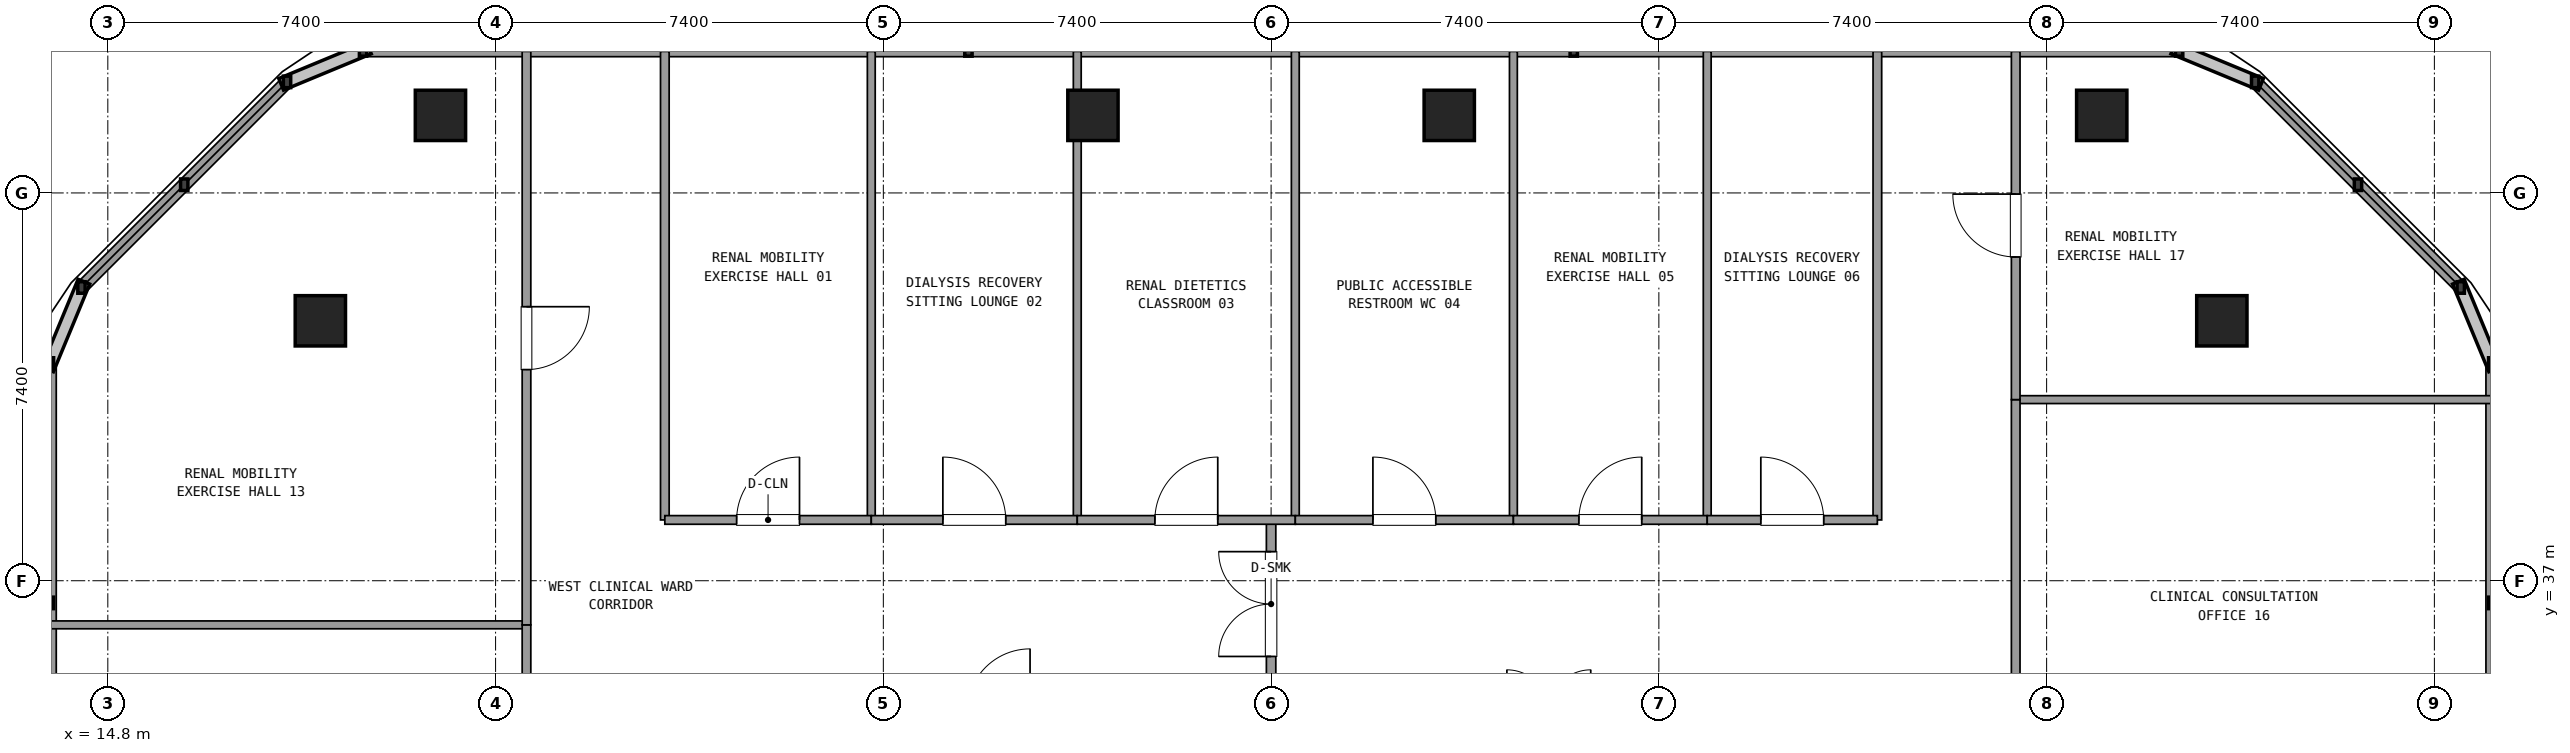
"""IFC4 building model, lengths in metres.
Left out: names, types, materials, properties, quantities, classifications, styles, units other than length and angle.
Written with IfcOpenShell. Run it as: python <this file> out.ifc"""

import sys

from ifc_helpers import new_model, si_unit, direction, frame, frame_2d, origin, origin_2d, place, context, subcontext, project, spatial, rectangle, extrude, element, fill, save


model = new_model("IFC4")
c1 = context("Model", 3, precision=1e-05, world=origin(), true_north=direction((0.0, 1.0)))
c2 = subcontext(c1, "Body", "Model", "MODEL_VIEW")
j1 = project(units=[si_unit("LENGTHUNIT", "METRE"), si_unit("PLANEANGLEUNIT", "RADIAN")], contexts=[c1])
p1 = place(None, origin())
s1 = spatial("IfcSite", under=j1, at=p1, CompositionType="ELEMENT")
p2 = place(p1, origin())
s2 = spatial("IfcBuilding", under=s1, at=p2, CompositionType="ELEMENT")
p3 = place(p2, frame((0.0, 0.0, 156.42)))
s3 = spatial("IfcBuildingStorey", under=s2, at=p3, CompositionType="ELEMENT", Elevation=156.42)
for number, where, z_axis, x_axis in (
    (1, (55.144, 41.96, 0.0), (0.0, 0.0, 1.0), (1.0, 0.0, 0.0)),
    (2, (52.852, 45.88, 0.0), (0.0, 0.0, 1.0), (1.0, 0.0, 0.0)),
    (3, (40.4, 45.88, 0.0), (0.0, 0.0, 1.0), (1.0, 0.0, 0.0)),
    (4, (33.6, 45.88, 0.0), (0.0, 0.0, 1.0), (1.0, 0.0, 0.0)),
    (5, (21.148, 45.88, 0.0), (0.0, 0.0, 1.0), (1.0, 0.0, 0.0)),
    (6, (18.856, 41.96, 0.0), (0.0, 0.0, 1.0), (1.0, 0.0, 0.0)),
):
    element("IfcColumn", number, at=place(p3, frame(where, z_axis=z_axis, x_axis=x_axis)), inside=s3, PredefinedType="COLUMN", context=c2, shape_type="SweptSolid", body=[
        extrude(rectangle(XDim=0.96, YDim=0.96, at=origin_2d()), origin(), (0.0, 0.0, 1.0), 3.6),
    ])
p4 = place(p3, frame((60.304, 27.44, 0.0), z_axis=(0.0, 0.0, 1.0), x_axis=(0.0, 1.0, 0.0)))
e7 = element("IfcWall", 7, at=p4, inside=s3, PredefinedType="SOLIDWALL", context=c2, shape_type="SweptSolid", body=[
    extrude(rectangle(XDim=13.705, YDim=0.24, at=frame_2d((6.853, 0.0))), origin(), (0.0, 0.0, 1.0), 0.85),
])
p5 = place(p3, frame((59.703, 42.596, 0.0), z_axis=(0.0, 0.0, 1.0), x_axis=(-0.707084777957, 0.707128783731, 0.0)))
e8 = element("IfcWall", 8, at=p5, inside=s3, PredefinedType="SOLIDWALL", context=c2, shape_type="SweptSolid", body=[
    extrude(rectangle(XDim=5.548, YDim=0.24, at=frame_2d((2.774, 0.0))), origin(), (0.0, 0.0, 1.0), 0.85),
])
p6 = place(p3, frame((54.329, 47.12, 0.0), z_axis=(0.0, 0.0, 1.0), x_axis=(-1.0, 0.0, 0.0)))
e9 = element("IfcWall", 9, at=p6, inside=s3, PredefinedType="SOLIDWALL", context=c2, shape_type="SweptSolid", body=[
    extrude(rectangle(XDim=34.658, YDim=0.24, at=frame_2d((17.329, 0.0))), origin(), (0.0, 0.0, 1.0), 0.85),
])
p7 = place(p3, frame((18.22, 46.519, 0.0), z_axis=(0.0, 0.0, 1.0), x_axis=(-0.707084777957, -0.707128783731, 0.0)))
e10 = element("IfcWall", 10, at=p7, inside=s3, PredefinedType="SOLIDWALL", context=c2, shape_type="SweptSolid", body=[
    extrude(rectangle(XDim=5.548, YDim=0.24, at=frame_2d((2.774, 0.0))), origin(), (0.0, 0.0, 1.0), 0.85),
])
p8 = place(p3, frame((13.696, 41.145, 0.0), z_axis=(0.0, 0.0, 1.0), x_axis=(0.0, -1.0, 0.0)))
e11 = element("IfcWall", 11, at=p8, inside=s3, PredefinedType="SOLIDWALL", context=c2, shape_type="SweptSolid", body=[
    extrude(rectangle(XDim=13.705, YDim=0.24, at=frame_2d((6.853, 0.0))), origin(), (0.0, 0.0, 1.0), 0.85),
])
p9 = place(p3, frame((37.0, 34.95, 0.0), z_axis=(0.0, 0.0, 1.0), x_axis=(0.0, 1.0, 0.0)))
e12 = element("IfcWall", 12, at=p9, inside=s3, PredefinedType="PARTITIONING", context=c2, shape_type="SweptSolid", body=[
    extrude(rectangle(XDim=3.21, YDim=0.18, at=frame_2d((1.605, 0.0))), origin(), (0.0, 0.0, 1.0), 2.61),
])
p10 = place(p9, frame((0.605, 0.0, 0.0)))
e13 = element("IfcOpeningElement", 13, at=p10, cuts=e12, PredefinedType="OPENING", context=c2, shape_type="SweptSolid", body=[
    extrude(rectangle(XDim=2.0, YDim=2.2, at=frame_2d((1.0, 1.1))), frame((0.0, 0.1, 0.0), z_axis=(0.0, -1.0, 0.0), x_axis=(1.0, 0.0, 0.0)), (0.0, 0.0, 1.0), 0.2),
])
for number, where, z_axis, x_axis in (
    (14, (25.43, 38.16, 0.0), (0.0, 0.0, 1.0), (0.0, 1.0, 0.0)),
    (15, (48.57, 38.16, 0.0), (0.0, 0.0, 1.0), (0.0, 1.0, 0.0)),
):
    element("IfcWall", number, at=place(p3, frame(where, z_axis=z_axis, x_axis=x_axis)), inside=s3, PredefinedType="PARTITIONING", context=c2, shape_type="SweptSolid", body=[
        extrude(rectangle(XDim=8.94, YDim=0.165, at=frame_2d((4.47, 0.0))), origin(), (0.0, 0.0, 1.0), 2.61),
    ])
p11 = place(p3, frame((29.37, 38.16, 0.0), z_axis=(0.0, 0.0, 1.0), x_axis=(0.0, 1.0, 0.0)))
e16 = element("IfcWall", 16, at=p11, inside=s3, PredefinedType="PARTITIONING", context=c2, shape_type="SweptSolid", body=[
    extrude(rectangle(XDim=8.94, YDim=0.15, at=frame_2d((4.47, 0.0))), origin(), (0.0, 0.0, 1.0), 2.61),
])
p12 = place(p3, frame((25.43, 38.16, 0.0), z_axis=(0.0, 0.0, 1.0), x_axis=(1.0, 0.0, 0.0)))
e17 = element("IfcWall", 17, at=p12, inside=s3, PredefinedType="PARTITIONING", context=c2, shape_type="SweptSolid", body=[
    extrude(rectangle(XDim=3.94, YDim=0.165, at=frame_2d((1.97, 0.0))), origin(), (0.0, 0.0, 1.0), 2.61),
])
p13 = place(p12, frame((1.37, 0.0, 0.0)))
e18 = element("IfcOpeningElement", 18, at=p13, cuts=e17, PredefinedType="OPENING", context=c2, shape_type="SweptSolid", body=[
    extrude(rectangle(XDim=1.2, YDim=2.15, at=frame_2d((0.6, 1.075))), frame((0.0, 0.093, 0.0), z_axis=(0.0, -1.0, 0.0), x_axis=(1.0, 0.0, 0.0)), (0.0, 0.0, 1.0), 0.185),
])
p14 = place(p3, frame((33.301, 38.16, 0.0), z_axis=(0.0, 0.0, 1.0), x_axis=(0.0, 1.0, 0.0)))
e19 = element("IfcWall", 19, at=p14, inside=s3, PredefinedType="PARTITIONING", context=c2, shape_type="SweptSolid", body=[
    extrude(rectangle(XDim=8.94, YDim=0.15, at=frame_2d((4.47, 0.0))), origin(), (0.0, 0.0, 1.0), 2.61),
])
p15 = place(p3, frame((29.37, 38.16, 0.0), z_axis=(0.0, 0.0, 1.0), x_axis=(1.0, 0.0, 0.0)))
e20 = element("IfcWall", 20, at=p15, inside=s3, PredefinedType="PARTITIONING", context=c2, shape_type="SweptSolid", body=[
    extrude(rectangle(XDim=3.931, YDim=0.165, at=frame_2d((1.965, 0.0))), origin(), (0.0, 0.0, 1.0), 2.61),
])
p16 = place(p15, frame((1.366, 0.0, 0.0)))
e21 = element("IfcOpeningElement", 21, at=p16, cuts=e20, PredefinedType="OPENING", context=c2, shape_type="SweptSolid", body=[
    extrude(rectangle(XDim=1.2, YDim=2.15, at=frame_2d((0.6, 1.075))), frame((0.0, 0.093, 0.0), z_axis=(0.0, -1.0, 0.0), x_axis=(1.0, 0.0, 0.0)), (0.0, 0.0, 1.0), 0.185),
])
p17 = place(p3, frame((37.462, 38.16, 0.0), z_axis=(0.0, 0.0, 1.0), x_axis=(0.0, 1.0, 0.0)))
e22 = element("IfcWall", 22, at=p17, inside=s3, PredefinedType="PARTITIONING", context=c2, shape_type="SweptSolid", body=[
    extrude(rectangle(XDim=8.94, YDim=0.15, at=frame_2d((4.47, 0.0))), origin(), (0.0, 0.0, 1.0), 2.61),
])
p18 = place(p3, frame((33.301, 38.16, 0.0), z_axis=(0.0, 0.0, 1.0), x_axis=(1.0, 0.0, 0.0)))
e23 = element("IfcWall", 23, at=p18, inside=s3, PredefinedType="PARTITIONING", context=c2, shape_type="SweptSolid", body=[
    extrude(rectangle(XDim=4.161, YDim=0.165, at=frame_2d((2.081, 0.0))), origin(), (0.0, 0.0, 1.0), 2.61),
])
p19 = place(p18, frame((1.481, 0.0, 0.0)))
e24 = element("IfcOpeningElement", 24, at=p19, cuts=e23, PredefinedType="OPENING", context=c2, shape_type="SweptSolid", body=[
    extrude(rectangle(XDim=1.2, YDim=2.15, at=frame_2d((0.6, 1.075))), frame((0.0, 0.093, 0.0), z_axis=(0.0, -1.0, 0.0), x_axis=(1.0, 0.0, 0.0)), (0.0, 0.0, 1.0), 0.185),
])
p20 = place(p3, frame((41.624, 38.16, 0.0), z_axis=(0.0, 0.0, 1.0), x_axis=(0.0, 1.0, 0.0)))
e25 = element("IfcWall", 25, at=p20, inside=s3, PredefinedType="PARTITIONING", context=c2, shape_type="SweptSolid", body=[
    extrude(rectangle(XDim=8.94, YDim=0.15, at=frame_2d((4.47, 0.0))), origin(), (0.0, 0.0, 1.0), 2.61),
])
p21 = place(p3, frame((37.462, 38.16, 0.0), z_axis=(0.0, 0.0, 1.0), x_axis=(1.0, 0.0, 0.0)))
e26 = element("IfcWall", 26, at=p21, inside=s3, PredefinedType="PARTITIONING", context=c2, shape_type="SweptSolid", body=[
    extrude(rectangle(XDim=4.162, YDim=0.165, at=frame_2d((2.081, 0.0))), origin(), (0.0, 0.0, 1.0), 2.61),
])
p22 = place(p21, frame((1.481, 0.0, 0.0)))
e27 = element("IfcOpeningElement", 27, at=p22, cuts=e26, PredefinedType="OPENING", context=c2, shape_type="SweptSolid", body=[
    extrude(rectangle(XDim=1.2, YDim=2.15, at=frame_2d((0.6, 1.075))), frame((0.0, 0.093, 0.0), z_axis=(0.0, -1.0, 0.0), x_axis=(1.0, 0.0, 0.0)), (0.0, 0.0, 1.0), 0.185),
])
p23 = place(p3, frame((45.323, 38.16, 0.0), z_axis=(0.0, 0.0, 1.0), x_axis=(0.0, 1.0, 0.0)))
e28 = element("IfcWall", 28, at=p23, inside=s3, PredefinedType="PARTITIONING", context=c2, shape_type="SweptSolid", body=[
    extrude(rectangle(XDim=8.94, YDim=0.15, at=frame_2d((4.47, 0.0))), origin(), (0.0, 0.0, 1.0), 2.61),
])
p24 = place(p3, frame((41.624, 38.16, 0.0), z_axis=(0.0, 0.0, 1.0), x_axis=(1.0, 0.0, 0.0)))
e29 = element("IfcWall", 29, at=p24, inside=s3, PredefinedType="PARTITIONING", context=c2, shape_type="SweptSolid", body=[
    extrude(rectangle(XDim=3.699, YDim=0.165, at=frame_2d((1.85, 0.0))), origin(), (0.0, 0.0, 1.0), 2.61),
])
p25 = place(p24, frame((1.249, 0.0, 0.0)))
e30 = element("IfcOpeningElement", 30, at=p25, cuts=e29, PredefinedType="OPENING", context=c2, shape_type="SweptSolid", body=[
    extrude(rectangle(XDim=1.2, YDim=2.15, at=frame_2d((0.6, 1.075))), frame((0.0, 0.093, 0.0), z_axis=(0.0, -1.0, 0.0), x_axis=(1.0, 0.0, 0.0)), (0.0, 0.0, 1.0), 0.185),
])
p26 = place(p3, frame((45.323, 38.16, 0.0), z_axis=(0.0, 0.0, 1.0), x_axis=(1.0, 0.0, 0.0)))
e31 = element("IfcWall", 31, at=p26, inside=s3, PredefinedType="PARTITIONING", context=c2, shape_type="SweptSolid", body=[
    extrude(rectangle(XDim=3.247, YDim=0.165, at=frame_2d((1.624, 0.0))), origin(), (0.0, 0.0, 1.0), 2.61),
])
p27 = place(p26, frame((1.023, 0.0, 0.0)))
e32 = element("IfcOpeningElement", 32, at=p27, cuts=e31, PredefinedType="OPENING", context=c2, shape_type="SweptSolid", body=[
    extrude(rectangle(XDim=1.2, YDim=2.15, at=frame_2d((0.6, 1.075))), frame((0.0, 0.093, 0.0), z_axis=(0.0, -1.0, 0.0), x_axis=(1.0, 0.0, 0.0)), (0.0, 0.0, 1.0), 0.185),
])
p28 = place(p3, frame((22.79, 36.158, 0.0), z_axis=(0.0, 0.0, 1.0), x_axis=(-1.0, 0.0, 0.0)))
e33 = element("IfcWall", 33, at=p28, inside=s3, PredefinedType="PARTITIONING", context=c2, shape_type="SweptSolid", body=[
    extrude(rectangle(XDim=9.074, YDim=0.15, at=frame_2d((4.537, 0.0))), origin(), (0.0, 0.0, 1.0), 2.61),
])
p29 = place(p3, frame((22.79, 27.56, 0.0), z_axis=(0.0, 0.0, 1.0), x_axis=(0.0, 1.0, 0.0)))
e34 = element("IfcWall", 34, at=p29, inside=s3, PredefinedType="PARTITIONING", context=c2, shape_type="SweptSolid", body=[
    extrude(rectangle(XDim=8.598, YDim=0.165, at=frame_2d((4.299, 0.0))), origin(), (0.0, 0.0, 1.0), 2.61),
])
p30 = place(p29, frame((3.699, 0.0, 0.0)))
e35 = element("IfcOpeningElement", 35, at=p30, cuts=e34, PredefinedType="OPENING", context=c2, shape_type="SweptSolid", body=[
    extrude(rectangle(XDim=1.2, YDim=2.15, at=frame_2d((0.6, 1.075))), frame((0.0, 0.093, 0.0), z_axis=(0.0, -1.0, 0.0), x_axis=(1.0, 0.0, 0.0)), (0.0, 0.0, 1.0), 0.185),
])
p31 = place(p3, frame((22.79, 36.158, 0.0), z_axis=(0.0, 0.0, 1.0), x_axis=(0.0, 1.0, 0.0)))
e36 = element("IfcWall", 36, at=p31, inside=s3, PredefinedType="PARTITIONING", context=c2, shape_type="SweptSolid", body=[
    extrude(rectangle(XDim=10.942, YDim=0.165, at=frame_2d((5.471, 0.0))), origin(), (0.0, 0.0, 1.0), 2.61),
])
p32 = place(p31, frame((4.871, 0.0, 0.0)))
e37 = element("IfcOpeningElement", 37, at=p32, cuts=e36, PredefinedType="OPENING", context=c2, shape_type="SweptSolid", body=[
    extrude(rectangle(XDim=1.2, YDim=2.15, at=frame_2d((0.6, 1.075))), frame((0.0, 0.093, 0.0), z_axis=(0.0, -1.0, 0.0), x_axis=(1.0, 0.0, 0.0)), (0.0, 0.0, 1.0), 0.185),
])
p33 = place(p3, frame((51.21, 40.456, 0.0), z_axis=(0.0, 0.0, 1.0), x_axis=(1.0, 0.0, 0.0)))
e38 = element("IfcWall", 38, at=p33, inside=s3, PredefinedType="PARTITIONING", context=c2, shape_type="SweptSolid", body=[
    extrude(rectangle(XDim=9.074, YDim=0.15, at=frame_2d((4.537, 0.0))), origin(), (0.0, 0.0, 1.0), 2.61),
])
p34 = place(p3, frame((51.21, 27.56, 0.0), z_axis=(0.0, 0.0, 1.0), x_axis=(0.0, 1.0, 0.0)))
e39 = element("IfcWall", 39, at=p34, inside=s3, PredefinedType="PARTITIONING", context=c2, shape_type="SweptSolid", body=[
    extrude(rectangle(XDim=12.896, YDim=0.165, at=frame_2d((6.448, 0.0))), origin(), (0.0, 0.0, 1.0), 2.61),
])
p35 = place(p34, frame((5.848, 0.0, 0.0)))
e40 = element("IfcOpeningElement", 40, at=p35, cuts=e39, PredefinedType="OPENING", context=c2, shape_type="SweptSolid", body=[
    extrude(rectangle(XDim=1.2, YDim=2.15, at=frame_2d((0.6, 1.075))), frame((0.0, 0.093, 0.0), z_axis=(0.0, -1.0, 0.0), x_axis=(1.0, 0.0, 0.0)), (0.0, 0.0, 1.0), 0.185),
])
p36 = place(p3, frame((51.21, 40.456, 0.0), z_axis=(0.0, 0.0, 1.0), x_axis=(0.0, 1.0, 0.0)))
e41 = element("IfcWall", 41, at=p36, inside=s3, PredefinedType="PARTITIONING", context=c2, shape_type="SweptSolid", body=[
    extrude(rectangle(XDim=6.644, YDim=0.165, at=frame_2d((3.322, 0.0))), origin(), (0.0, 0.0, 1.0), 2.61),
])
p37 = place(p36, frame((2.722, 0.0, 0.0)))
e42 = element("IfcOpeningElement", 42, at=p37, cuts=e41, PredefinedType="OPENING", context=c2, shape_type="SweptSolid", body=[
    extrude(rectangle(XDim=1.2, YDim=2.15, at=frame_2d((0.6, 1.075))), frame((0.0, 0.093, 0.0), z_axis=(0.0, -1.0, 0.0), x_axis=(1.0, 0.0, 0.0)), (0.0, 0.0, 1.0), 0.185),
])
p38 = place(p10, origin())
e43 = element("IfcDoor", 43, at=p38, inside=s3, OperationType="DOUBLE_DOOR_SINGLE_SWING", PredefinedType="DOOR", context=c2, shape_type="SweptSolid", body=[
    extrude(rectangle(XDim=2.0, YDim=2.2, at=frame_2d((1.0, 1.1))), frame((0.0, 0.025, 0.0), z_axis=(0.0, -1.0, 0.0), x_axis=(1.0, 0.0, 0.0)), (0.0, 0.0, 1.0), 0.05),
])
fill(e13, e43)
p39 = place(p13, origin())
e44 = element("IfcDoor", 44, at=p39, inside=s3, OperationType="SINGLE_SWING_RIGHT", PredefinedType="DOOR", context=c2, shape_type="SweptSolid", body=[
    extrude(rectangle(XDim=1.2, YDim=2.15, at=frame_2d((0.6, 1.075))), frame((0.0, 0.025, 0.0), z_axis=(0.0, -1.0, 0.0), x_axis=(1.0, 0.0, 0.0)), (0.0, 0.0, 1.0), 0.05),
])
fill(e18, e44)
p40 = place(p16, origin())
e45 = element("IfcDoor", 45, at=p40, inside=s3, OperationType="SINGLE_SWING_LEFT", PredefinedType="DOOR", context=c2, shape_type="SweptSolid", body=[
    extrude(rectangle(XDim=1.2, YDim=2.15, at=frame_2d((0.6, 1.075))), frame((0.0, 0.025, 0.0), z_axis=(0.0, -1.0, 0.0), x_axis=(1.0, 0.0, 0.0)), (0.0, 0.0, 1.0), 0.05),
])
fill(e21, e45)
p41 = place(p19, origin())
e46 = element("IfcDoor", 46, at=p41, inside=s3, OperationType="SINGLE_SWING_RIGHT", PredefinedType="DOOR", context=c2, shape_type="SweptSolid", body=[
    extrude(rectangle(XDim=1.2, YDim=2.15, at=frame_2d((0.6, 1.075))), frame((0.0, 0.025, 0.0), z_axis=(0.0, -1.0, 0.0), x_axis=(1.0, 0.0, 0.0)), (0.0, 0.0, 1.0), 0.05),
])
fill(e24, e46)
p42 = place(p22, origin())
e47 = element("IfcDoor", 47, at=p42, inside=s3, OperationType="SINGLE_SWING_LEFT", PredefinedType="DOOR", context=c2, shape_type="SweptSolid", body=[
    extrude(rectangle(XDim=1.2, YDim=2.15, at=frame_2d((0.6, 1.075))), frame((0.0, 0.025, 0.0), z_axis=(0.0, -1.0, 0.0), x_axis=(1.0, 0.0, 0.0)), (0.0, 0.0, 1.0), 0.05),
])
fill(e27, e47)
p43 = place(p25, origin())
e48 = element("IfcDoor", 48, at=p43, inside=s3, OperationType="SINGLE_SWING_RIGHT", PredefinedType="DOOR", context=c2, shape_type="SweptSolid", body=[
    extrude(rectangle(XDim=1.2, YDim=2.15, at=frame_2d((0.6, 1.075))), frame((0.0, 0.025, 0.0), z_axis=(0.0, -1.0, 0.0), x_axis=(1.0, 0.0, 0.0)), (0.0, 0.0, 1.0), 0.05),
])
fill(e30, e48)
p44 = place(p27, origin())
e49 = element("IfcDoor", 49, at=p44, inside=s3, OperationType="SINGLE_SWING_LEFT", PredefinedType="DOOR", context=c2, shape_type="SweptSolid", body=[
    extrude(rectangle(XDim=1.2, YDim=2.15, at=frame_2d((0.6, 1.075))), frame((0.0, 0.025, 0.0), z_axis=(0.0, -1.0, 0.0), x_axis=(1.0, 0.0, 0.0)), (0.0, 0.0, 1.0), 0.05),
])
fill(e32, e49)
p45 = place(p32, frame((1.2, 0.0, 0.0), z_axis=(0.0, 0.0, 1.0), x_axis=(-1.0, 0.0, 0.0)))
e50 = element("IfcDoor", 50, at=p45, inside=s3, OperationType="SINGLE_SWING_RIGHT", PredefinedType="DOOR", context=c2, shape_type="SweptSolid", body=[
    extrude(rectangle(XDim=1.2, YDim=2.15, at=frame_2d((0.6, 1.075))), frame((0.0, 0.025, 0.0), z_axis=(0.0, -1.0, 0.0), x_axis=(1.0, 0.0, 0.0)), (0.0, 0.0, 1.0), 0.05),
])
fill(e37, e50)
p46 = place(p37, origin())
e51 = element("IfcDoor", 51, at=p46, inside=s3, OperationType="SINGLE_SWING_RIGHT", PredefinedType="DOOR", context=c2, shape_type="SweptSolid", body=[
    extrude(rectangle(XDim=1.2, YDim=2.15, at=frame_2d((0.6, 1.075))), frame((0.0, 0.025, 0.0), z_axis=(0.0, -1.0, 0.0), x_axis=(1.0, 0.0, 0.0)), (0.0, 0.0, 1.0), 0.05),
])
fill(e42, e51)
save(model, sys.argv[1])
